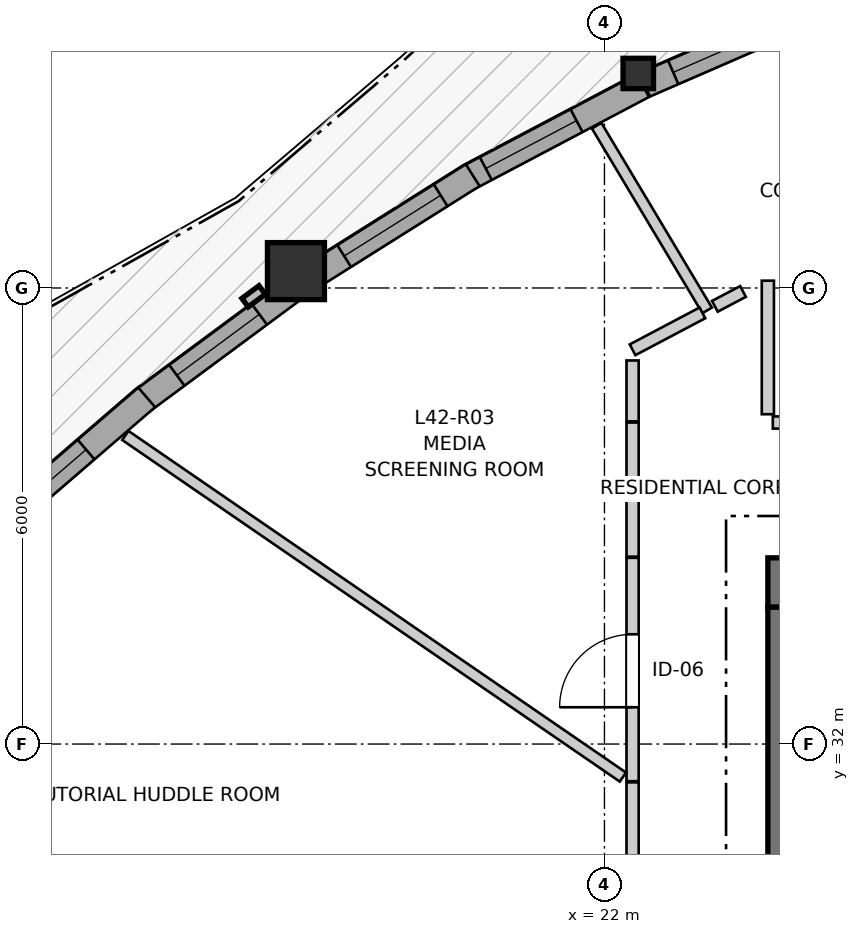
"""IFC4 building model, lengths in metres.
Left out: names, types, materials, properties, quantities, classifications, styles, units other than length and angle.
Written with IfcOpenShell. Run it as: python <this file> out.ifc"""

import sys

from ifc_helpers import new_model, si_unit, direction, frame, frame_2d, origin, origin_2d, place, context, subcontext, project, spatial, rectangle, i_section, extrude, source, transform, mapped, element, fill, save


model = new_model("IFC4")
c1 = context("Model", 3, precision=1e-05, world=origin(), true_north=direction((0.0, 1.0)))
c2 = subcontext(c1, "Body", "Model", "MODEL_VIEW")
j1 = project(units=[si_unit("LENGTHUNIT", "METRE"), si_unit("PLANEANGLEUNIT", "RADIAN")], contexts=[c1])
p1 = place(None, origin())
s1 = spatial("IfcSite", under=j1, at=p1, CompositionType="ELEMENT")
p2 = place(p1, origin())
s2 = spatial("IfcBuilding", under=s1, at=p2, CompositionType="ELEMENT")
p3 = place(p2, frame((0.0, 0.0, 142.6)))
s3 = spatial("IfcBuildingStorey", under=s2, at=p3, CompositionType="ELEMENT", Elevation=142.6)
p4 = place(p3, frame((36.55, 34.125, 0.0), z_axis=(0.0, 0.0, 1.0), x_axis=(-1.0, 0.0, 0.0)))
e1 = element("IfcWall", 1, at=p4, inside=s3, PredefinedType="SHEAR", context=c2, shape_type="SweptSolid", body=[
    extrude(rectangle(XDim=12.4, YDim=0.65, at=frame_2d((6.2, 0.0))), origin(), (0.0, 0.0, 1.0), 2.95),
])
p5 = place(p3, frame((24.475, 33.8, 0.0), z_axis=(0.0, 0.0, 1.0), x_axis=(0.0, -1.0, 0.0)))
e2 = element("IfcWall", 2, at=p5, inside=s3, PredefinedType="SHEAR", context=c2, shape_type="SweptSolid", body=[
    extrude(rectangle(XDim=15.6, YDim=0.65, at=frame_2d((7.8, 0.0))), origin(), (0.0, 0.0, 1.0), 2.95),
])
p6 = place(p5, frame((7.05, 0.0, 0.0)))
e3 = element("IfcOpeningElement", 3, at=p6, cuts=e2, PredefinedType="OPENING", context=c2, shape_type="SweptSolid", body=[
    extrude(rectangle(XDim=1.5, YDim=2.15, at=frame_2d((0.75, 1.075))), frame((0.0, 0.335, 0.0), z_axis=(0.0, -1.0, 0.0), x_axis=(1.0, 0.0, 0.0)), (0.0, 0.0, 1.0), 0.67),
])
p7 = place(p5, frame((3.52, 0.0, 0.0)))
e4 = element("IfcOpeningElement", 4, at=p7, cuts=e2, PredefinedType="OPENING", context=c2, shape_type="SweptSolid", body=[
    extrude(rectangle(XDim=0.86, YDim=2.05, at=frame_2d((0.43, 1.025))), frame((0.0, 0.335, 0.0), z_axis=(0.0, -1.0, 0.0), x_axis=(1.0, 0.0, 0.0)), (0.0, 0.0, 1.0), 0.67),
])
p8 = place(p5, frame((11.22, 0.0, 0.0)))
e5 = element("IfcOpeningElement", 5, at=p8, cuts=e2, PredefinedType="OPENING", context=c2, shape_type="SweptSolid", body=[
    extrude(rectangle(XDim=0.86, YDim=2.05, at=frame_2d((0.43, 1.025))), frame((0.0, 0.335, 0.0), z_axis=(0.0, -1.0, 0.0), x_axis=(1.0, 0.0, 0.0)), (0.0, 0.0, 1.0), 0.67),
])
m1 = source(origin(), c2, "Body", "SweptSolid", [
    extrude(i_section(OverallWidth=0.401, OverallDepth=0.399, WebThickness=0.023, FlangeThickness=0.036, FilletRadius=0.015, at=origin_2d()), origin(), (0.0, 0.0, 1.0), 2.95),
])
p9 = place(p3, frame((22.445, 40.822, 0.0), z_axis=(0.0, 0.0, 1.0), x_axis=(1.0, 0.0, 0.0)))
e6 = element("IfcColumn", 6, at=p9, inside=s3, PredefinedType="PILASTER", context=c2, shape_type="MappedRepresentation", body=[
    mapped(m1, transform((0.0, 0.0, 0.0), x_axis=(1.0, 0.0, 0.0), y_axis=(0.0, 1.0, 0.0), z_axis=(0.0, 0.0, 1.0), scale=1.0)),
])
m2 = source(origin(), c2, "Body", "SweptSolid", [
    extrude(rectangle(XDim=0.75, YDim=0.75, at=origin_2d()), origin(), (0.0, 0.0, 1.0), 2.95),
])
p10 = place(p3, frame((17.941, 38.222, 0.0), z_axis=(0.0, 0.0, 1.0), x_axis=(1.0, 0.0, 0.0)))
e7 = element("IfcColumn", 7, at=p10, inside=s3, PredefinedType="COLUMN", context=c2, shape_type="MappedRepresentation", body=[
    mapped(m2, transform((0.0, 0.0, 0.0), x_axis=(1.0, 0.0, 0.0), y_axis=(0.0, 1.0, 0.0), z_axis=(0.0, 0.0, 1.0), scale=1.0)),
])
p11 = place(p3, frame((24.948, 41.725, 0.0), z_axis=(0.0, 0.0, 1.0), x_axis=(-0.917067110524, -0.398732886523, 0.0)))
e8 = element("IfcWall", 8, at=p11, inside=s3, PredefinedType="SOLIDWALL", context=c2, shape_type="SweptSolid", body=[
    extrude(rectangle(XDim=2.635, YDim=0.34, at=frame_2d((1.318, 0.0))), origin(), (0.0, 0.0, 1.0), 2.53),
])
p12 = place(p11, frame((0.427, 0.0, 0.82)))
e9 = element("IfcOpeningElement", 9, at=p12, cuts=e8, PredefinedType="OPENING", context=c2, shape_type="SweptSolid", body=[
    extrude(rectangle(XDim=1.8, YDim=1.45, at=frame_2d((0.9, 0.725))), frame((0.0, 0.18, 0.0), z_axis=(0.0, -1.0, 0.0), x_axis=(1.0, 0.0, 0.0)), (0.0, 0.0, 1.0), 0.36),
])
p13 = place(p3, frame((22.507, 40.663, 0.0), z_axis=(0.0, 0.0, 1.0), x_axis=(-0.884410392718, -0.466710035517, 0.0)))
e10 = element("IfcWall", 10, at=p13, inside=s3, PredefinedType="SOLIDWALL", context=c2, shape_type="SweptSolid", body=[
    extrude(rectangle(XDim=2.62, YDim=0.34, at=frame_2d((1.31, 0.0))), origin(), (0.0, 0.0, 1.0), 2.53),
])
p14 = place(p13, frame((0.988, 0.0, 0.82)))
e11 = element("IfcOpeningElement", 11, at=p14, cuts=e10, PredefinedType="OPENING", context=c2, shape_type="SweptSolid", body=[
    extrude(rectangle(XDim=1.35, YDim=1.45, at=frame_2d((0.675, 0.725))), frame((0.0, 0.18, 0.0), z_axis=(0.0, -1.0, 0.0), x_axis=(1.0, 0.0, 0.0)), (0.0, 0.0, 1.0), 0.36),
])
p15 = place(p3, frame((20.266, 39.484, 0.0), z_axis=(0.0, 0.0, 1.0), x_axis=(-0.84647717658, -0.532425008363, 0.0)))
e12 = element("IfcWall", 12, at=p15, inside=s3, PredefinedType="SOLIDWALL", context=c2, shape_type="SweptSolid", body=[
    extrude(rectangle(XDim=2.485, YDim=0.34, at=frame_2d((1.243, 0.0))), origin(), (0.0, 0.0, 1.0), 2.53),
])
p16 = place(p15, frame((0.498, 0.0, 0.82)))
e13 = element("IfcOpeningElement", 13, at=p16, cuts=e12, PredefinedType="OPENING", context=c2, shape_type="SweptSolid", body=[
    extrude(rectangle(XDim=1.5, YDim=1.45, at=frame_2d((0.75, 0.725))), frame((0.0, 0.18, 0.0), z_axis=(0.0, -1.0, 0.0), x_axis=(1.0, 0.0, 0.0)), (0.0, 0.0, 1.0), 0.36),
])
p17 = place(p3, frame((17.917, 37.993, 0.0), z_axis=(0.0, 0.0, 1.0), x_axis=(-0.803792400414, -0.594909889846, 0.0)))
e14 = element("IfcWall", 14, at=p17, inside=s3, PredefinedType="SOLIDWALL", context=c2, shape_type="SweptSolid", body=[
    extrude(rectangle(XDim=2.5, YDim=0.34, at=frame_2d((1.25, 0.0))), origin(), (0.0, 0.0, 1.0), 2.53),
])
p18 = place(p17, frame((0.57, 0.0, 0.82)))
e15 = element("IfcOpeningElement", 15, at=p18, cuts=e14, PredefinedType="OPENING", context=c2, shape_type="SweptSolid", body=[
    extrude(rectangle(XDim=1.35, YDim=1.45, at=frame_2d((0.675, 0.725))), frame((0.0, 0.18, 0.0), z_axis=(0.0, -1.0, 0.0), x_axis=(1.0, 0.0, 0.0)), (0.0, 0.0, 1.0), 0.36),
])
p19 = place(p3, frame((15.977, 36.561, 0.0), z_axis=(0.0, 0.0, 1.0), x_axis=(-0.757481825022, -0.652856251223, 0.0)))
e16 = element("IfcWall", 16, at=p19, inside=s3, PredefinedType="SOLIDWALL", context=c2, shape_type="SweptSolid", body=[
    extrude(rectangle(XDim=2.665, YDim=0.34, at=frame_2d((1.333, 0.0))), origin(), (0.0, 0.0, 1.0), 2.53),
])
p20 = place(p19, frame((1.052, 0.0, 0.82)))
e17 = element("IfcOpeningElement", 17, at=p20, cuts=e16, PredefinedType="OPENING", context=c2, shape_type="SweptSolid", body=[
    extrude(rectangle(XDim=1.05, YDim=1.45, at=frame_2d((0.525, 0.725))), frame((0.0, 0.18, 0.0), z_axis=(0.0, -1.0, 0.0), x_axis=(1.0, 0.0, 0.0)), (0.0, 0.0, 1.0), 0.36),
])
p21 = place(p3, frame((24.215, 36.23, 0.0), z_axis=(0.0, 0.0, 1.0), x_axis=(1.0, 0.0, 0.0)))
e18 = element("IfcWall", 18, at=p21, inside=s3, PredefinedType="PARTITIONING", context=c2, shape_type="SweptSolid", body=[
    extrude(rectangle(XDim=3.745, YDim=0.16, at=frame_2d((1.873, 0.0))), origin(), (0.0, 0.0, 1.0), 2.95),
])
p22 = place(p21, frame((1.247, 0.0, 0.0)))
e19 = element("IfcOpeningElement", 19, at=p22, cuts=e18, PredefinedType="OPENING", context=c2, shape_type="SweptSolid", body=[
    extrude(rectangle(XDim=1.3, YDim=2.1, at=frame_2d((0.65, 1.05))), frame((0.0, 0.09, 0.0), z_axis=(0.0, -1.0, 0.0), x_axis=(1.0, 0.0, 0.0)), (0.0, 0.0, 1.0), 0.18),
])
p23 = place(p3, frame((22.37, 27.85, 0.0), z_axis=(0.0, 0.0, 1.0), x_axis=(0.0, 1.0, 0.0)))
e20 = element("IfcWall", 20, at=p23, inside=s3, PredefinedType="PARTITIONING", context=c2, shape_type="SweptSolid", body=[
    extrude(rectangle(XDim=3.646, YDim=0.16, at=frame_2d((1.823, 0.0))), origin(), (0.0, 0.0, 1.0), 2.95),
])
p24 = place(p23, frame((1.194, 0.0, 0.0)))
e21 = element("IfcOpeningElement", 21, at=p24, cuts=e20, PredefinedType="OPENING", context=c2, shape_type="SweptSolid", body=[
    extrude(rectangle(XDim=1.3, YDim=2.1, at=frame_2d((0.65, 1.05))), frame((0.0, 0.09, 0.0), z_axis=(0.0, -1.0, 0.0), x_axis=(1.0, 0.0, 0.0)), (0.0, 0.0, 1.0), 0.18),
])
p25 = place(p3, frame((22.37, 31.511, 0.0), z_axis=(0.0, 0.0, 1.0), x_axis=(0.0, 1.0, 0.0)))
e22 = element("IfcWall", 22, at=p25, inside=s3, PredefinedType="PARTITIONING", context=c2, shape_type="SweptSolid", body=[
    extrude(rectangle(XDim=2.939, YDim=0.16, at=frame_2d((1.469, 0.0))), origin(), (0.0, 0.0, 1.0), 2.95),
])
p26 = place(p25, frame((0.973, 0.0, 0.0)))
e23 = element("IfcOpeningElement", 23, at=p26, cuts=e22, PredefinedType="OPENING", context=c2, shape_type="SweptSolid", body=[
    extrude(rectangle(XDim=0.96, YDim=2.1, at=frame_2d((0.48, 1.05))), frame((0.0, 0.09, 0.0), z_axis=(0.0, -1.0, 0.0), x_axis=(1.0, 0.0, 0.0)), (0.0, 0.0, 1.0), 0.18),
])
p27 = place(p3, frame((15.696, 36.06, 0.0), z_axis=(0.0, 0.0, 1.0), x_axis=(0.824423900824, -0.565972818914, 0.0)))
e24 = element("IfcWall", 24, at=p27, inside=s3, PredefinedType="PARTITIONING", context=c2, shape_type="SweptSolid", body=[
    extrude(rectangle(XDim=7.941, YDim=0.145, at=frame_2d((3.97, 0.0))), origin(), (0.0, 0.0, 1.0), 2.95),
])
p28 = place(p3, frame((21.897, 40.135, 0.0), z_axis=(0.0, 0.0, 1.0), x_axis=(0.513392323606, -0.858154020012, 0.0)))
e25 = element("IfcWall", 25, at=p28, inside=s3, PredefinedType="PARTITIONING", context=c2, shape_type="SweptSolid", body=[
    extrude(rectangle(XDim=2.832, YDim=0.145, at=frame_2d((1.416, 0.0))), origin(), (0.0, 0.0, 1.0), 2.95),
])
p29 = place(p3, frame((22.37, 34.465, 0.0), z_axis=(0.0, 0.0, 1.0), x_axis=(0.0, 1.0, 0.0)))
e26 = element("IfcWall", 26, at=p29, inside=s3, PredefinedType="PARTITIONING", context=c2, shape_type="SweptSolid", body=[
    extrude(rectangle(XDim=1.765, YDim=0.16, at=frame_2d((0.882, 0.0))), origin(), (0.0, 0.0, 1.0), 2.95),
])
p30 = place(p3, frame((24.15, 36.339, 0.0), z_axis=(0.0, 0.0, 1.0), x_axis=(0.0, 1.0, 0.0)))
e27 = element("IfcWall", 27, at=p30, inside=s3, PredefinedType="PARTITIONING", context=c2, shape_type="SweptSolid", body=[
    extrude(rectangle(XDim=1.757, YDim=0.16, at=frame_2d((0.878, 0.0))), origin(), (0.0, 0.0, 1.0), 2.95),
])
p31 = place(p3, frame((22.37, 37.187, 0.0), z_axis=(0.0, 0.0, 1.0), x_axis=(0.884244639112, 0.467024001741, 0.0)))
e28 = element("IfcWall", 28, at=p31, inside=s3, PredefinedType="PARTITIONING", context=c2, shape_type="SweptSolid", body=[
    extrude(rectangle(XDim=1.039, YDim=0.16, at=frame_2d((0.52, 0.0))), origin(), (0.0, 0.0, 1.0), 2.558),
])
p32 = place(p3, frame((22.37, 36.245, 0.0), z_axis=(0.0, 0.0, 1.0), x_axis=(0.0, 1.0, 0.0)))
e29 = element("IfcWall", 29, at=p32, inside=s3, PredefinedType="PARTITIONING", context=c2, shape_type="SweptSolid", body=[
    extrude(rectangle(XDim=0.801, YDim=0.16, at=frame_2d((0.401, 0.0))), origin(), (0.0, 0.0, 1.0), 2.95),
])
p33 = place(p3, frame((23.452, 37.759, 0.0), z_axis=(0.0, 0.0, 1.0), x_axis=(0.884665257528, 0.466226749686, 0.0)))
e30 = element("IfcWall", 30, at=p33, inside=s3, PredefinedType="PARTITIONING", context=c2, shape_type="SweptSolid", body=[
    extrude(rectangle(XDim=0.419, YDim=0.16, at=frame_2d((0.209, 0.0))), origin(), (0.0, 0.0, 1.0), 2.558),
])
m3 = source(origin(), c2, "Body", "SweptSolid", [
    extrude(rectangle(XDim=1.8, YDim=1.45, at=frame_2d((0.9, 0.725))), frame((0.0, 0.03, 0.0), z_axis=(0.0, -1.0, 0.0), x_axis=(1.0, 0.0, 0.0)), (0.0, 0.0, 1.0), 0.06),
])
p34 = place(p12, origin())
e31 = element("IfcWindow", 31, at=p34, inside=s3, PartitioningType="SINGLE_PANEL", PredefinedType="WINDOW", context=c2, shape_type="MappedRepresentation", body=[
    mapped(m3, transform((0.0, 0.0, 0.0), x_axis=(1.0, 0.0, 0.0), y_axis=(0.0, 1.0, 0.0), z_axis=(0.0, 0.0, 1.0), scale=1.0)),
])
fill(e9, e31)
m4 = source(origin(), c2, "Body", "SweptSolid", [
    extrude(rectangle(XDim=1.35, YDim=1.45, at=frame_2d((0.675, 0.725))), frame((0.0, 0.03, 0.0), z_axis=(0.0, -1.0, 0.0), x_axis=(1.0, 0.0, 0.0)), (0.0, 0.0, 1.0), 0.06),
])
p35 = place(p14, origin())
e32 = element("IfcWindow", 32, at=p35, inside=s3, PartitioningType="SINGLE_PANEL", PredefinedType="WINDOW", context=c2, shape_type="MappedRepresentation", body=[
    mapped(m4, transform((0.0, 0.0, 0.0), x_axis=(1.0, 0.0, 0.0), y_axis=(0.0, 1.0, 0.0), z_axis=(0.0, 0.0, 1.0), scale=1.0)),
])
fill(e11, e32)
m5 = source(origin(), c2, "Body", "SweptSolid", [
    extrude(rectangle(XDim=1.5, YDim=1.45, at=frame_2d((0.75, 0.725))), frame((0.0, 0.03, 0.0), z_axis=(0.0, -1.0, 0.0), x_axis=(1.0, 0.0, 0.0)), (0.0, 0.0, 1.0), 0.06),
])
p36 = place(p16, origin())
e33 = element("IfcWindow", 33, at=p36, inside=s3, PartitioningType="SINGLE_PANEL", PredefinedType="WINDOW", context=c2, shape_type="MappedRepresentation", body=[
    mapped(m5, transform((0.0, 0.0, 0.0), x_axis=(1.0, 0.0, 0.0), y_axis=(0.0, 1.0, 0.0), z_axis=(0.0, 0.0, 1.0), scale=1.0)),
])
fill(e13, e33)
p37 = place(p18, origin())
e34 = element("IfcWindow", 34, at=p37, inside=s3, PartitioningType="SINGLE_PANEL", PredefinedType="WINDOW", context=c2, shape_type="MappedRepresentation", body=[
    mapped(m4, transform((0.0, 0.0, 0.0), x_axis=(1.0, 0.0, 0.0), y_axis=(0.0, 1.0, 0.0), z_axis=(0.0, 0.0, 1.0), scale=1.0)),
])
fill(e15, e34)
m6 = source(origin(), c2, "Body", "SweptSolid", [
    extrude(rectangle(XDim=1.05, YDim=1.45, at=frame_2d((0.525, 0.725))), frame((0.0, 0.03, 0.0), z_axis=(0.0, -1.0, 0.0), x_axis=(1.0, 0.0, 0.0)), (0.0, 0.0, 1.0), 0.06),
])
p38 = place(p20, origin())
e35 = element("IfcWindow", 35, at=p38, inside=s3, PartitioningType="SINGLE_PANEL", PredefinedType="WINDOW", context=c2, shape_type="MappedRepresentation", body=[
    mapped(m6, transform((0.0, 0.0, 0.0), x_axis=(1.0, 0.0, 0.0), y_axis=(0.0, 1.0, 0.0), z_axis=(0.0, 0.0, 1.0), scale=1.0)),
])
fill(e17, e35)
m7 = source(origin(), c2, "Body", "SweptSolid", [
    extrude(rectangle(XDim=0.96, YDim=2.1, at=frame_2d((0.48, 1.05))), frame((0.0, 0.025, 0.0), z_axis=(0.0, -1.0, 0.0), x_axis=(1.0, 0.0, 0.0)), (0.0, 0.0, 1.0), 0.05),
])
p39 = place(p26, origin())
e36 = element("IfcDoor", 36, at=p39, inside=s3, OperationType="SINGLE_SWING_LEFT", PredefinedType="DOOR", context=c2, shape_type="MappedRepresentation", body=[
    mapped(m7, transform((0.0, 0.0, 0.0), x_axis=(1.0, 0.0, 0.0), y_axis=(0.0, 1.0, 0.0), z_axis=(0.0, 0.0, 1.0), scale=1.0)),
])
fill(e23, e36)
save(model, sys.argv[1])
